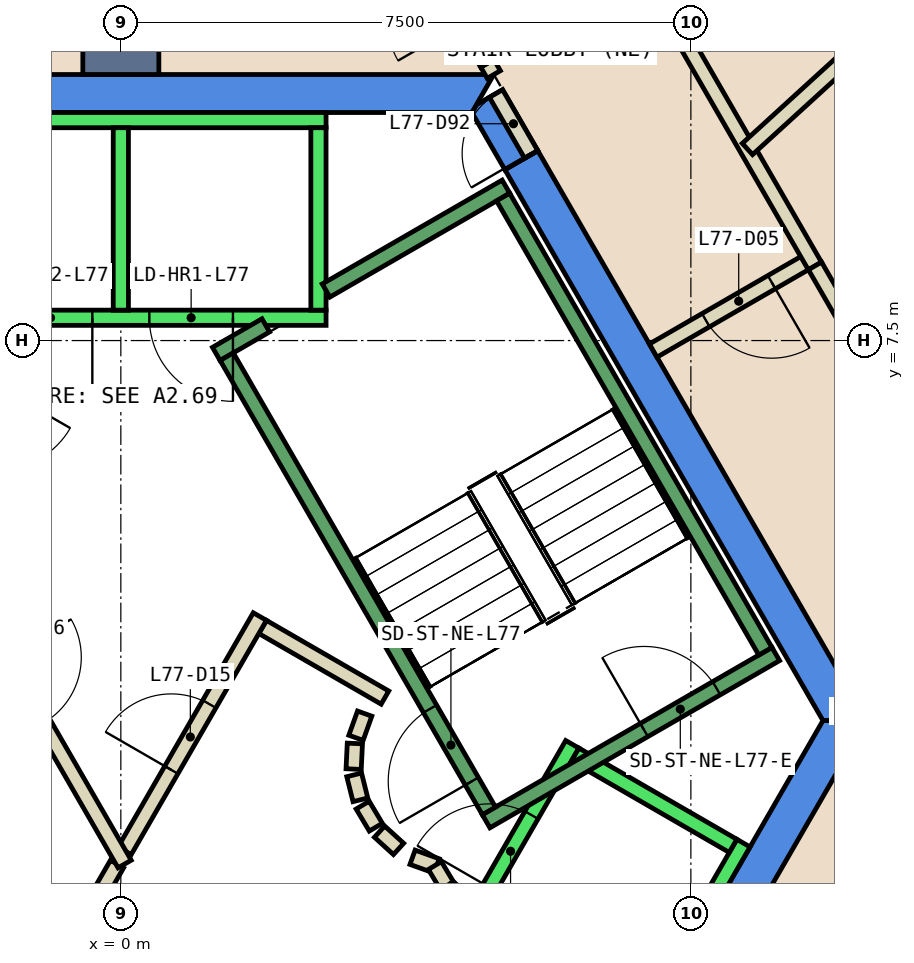
"""IFC4 building model, lengths in metres.
Left out: names, types, materials, properties, quantities, classifications, styles, units other than length and angle.
Written with IfcOpenShell. Run it as: python <this file> out.ifc"""

import sys

from ifc_helpers import new_model, si_unit, direction, frame, frame_2d, origin, place, context, subcontext, project, spatial, polyline, rectangle, outline, extrude, element, fill, save


model = new_model("IFC4")
c1 = context("Model", 3, precision=1e-05, world=origin(), true_north=direction((0.0, 1.0)))
c2 = subcontext(c1, "Body", "Model", "MODEL_VIEW")
j1 = project(units=[si_unit("LENGTHUNIT", "METRE"), si_unit("PLANEANGLEUNIT", "RADIAN")], contexts=[c1])
p1 = place(None, origin())
s1 = spatial("IfcSite", under=j1, at=p1, CompositionType="ELEMENT")
p2 = place(p1, origin())
s2 = spatial("IfcBuilding", under=s1, at=p2, CompositionType="ELEMENT")
p3 = place(p2, frame((0.0, 0.0, 326.0)))
s3 = spatial("IfcBuildingStorey", under=s2, at=p3, CompositionType="ELEMENT", Elevation=326.0)
p4 = place(p3, frame((0.0, 0.0, -0.6)))
e1 = element("IfcWall", 1, at=p4, inside=s3, PredefinedType="SHEAR", context=c2, shape_type="SweptSolid", body=[
    extrude(outline(polyline([(5.486, 9.998), (5.053, 9.748), (9.238, 2.5), (9.815, 2.5), (5.486, 9.998)])), origin(), (0.0, 0.0, 1.0), 5.55),
])
p5 = place(p3, frame((0.0, 0.0, 3.6)))
e2 = element("IfcWall", 2, at=p5, inside=s3, PredefinedType="SHEAR", context=c2, shape_type="SweptSolid", body=[
    extrude(outline(polyline([(5.022, 10.8), (4.677, 10.601), (4.619, 10.5), (5.053, 9.748), (5.486, 9.998), (5.022, 10.8)])), origin(), (0.0, 0.0, 1.0), 1.35),
])
p6 = place(p3, frame((0.0, 0.0, -0.6)))
e3 = element("IfcWall", 3, at=p6, inside=s3, PredefinedType="SHEAR", context=c2, shape_type="SweptSolid", body=[
    extrude(outline(polyline([(4.907, 11.0), (-4.907, 11.0), (-4.619, 10.5), (4.619, 10.5), (4.907, 11.0)])), origin(), (0.0, 0.0, 1.0), 5.55),
])
p7 = place(p3, frame((0.0, 0.0, -0.6)))
e4 = element("IfcWall", 4, at=p7, inside=s3, PredefinedType="SHEAR", context=c2, shape_type="SweptSolid", body=[
    extrude(outline(polyline([(4.907, -6.0), (9.815, 2.5), (9.238, 2.5), (4.619, -5.5), (4.907, -6.0)])), origin(), (0.0, 0.0, 1.0), 5.55),
])
p8 = place(p3, frame((0.0, 11.0, 0.0), z_axis=(0.0, 0.0, 1.0), x_axis=(0.0, 1.0, 0.0)))
e5 = element("IfcWall", 5, at=p8, inside=s3, PredefinedType="SHEAR", context=c2, shape_type="SweptSolid", body=[
    extrude(rectangle(XDim=13.702, YDim=1.0, at=frame_2d((6.851, 0.0))), origin(), (0.0, 0.0, 1.0), 4.95),
])
p9 = place(p3, frame((-0.982, -1.0, 0.0), z_axis=(0.0, 0.0, 1.0), x_axis=(0.50024047865, 0.865886518847, 0.0)))
e6 = element("IfcWall", 6, at=p9, inside=s3, PredefinedType="PARTITIONING", context=c2, shape_type="SweptSolid", body=[
    extrude(rectangle(XDim=1.863, YDim=0.2, at=frame_2d((0.931, 0.0))), origin(), (0.0, 0.0, 1.0), 4.95),
])
p10 = place(p3, frame((1.866, 3.732, 0.0), z_axis=(0.0, 0.0, 1.0), x_axis=(0.866043361281, -0.499968895414, 0.0)))
e7 = element("IfcWall", 7, at=p10, inside=s3, PredefinedType="PARTITIONING", context=c2, shape_type="SweptSolid", body=[
    extrude(rectangle(XDim=1.858, YDim=0.2, at=frame_2d((0.929, 0.0))), origin(), (0.0, 0.0, 1.0), 4.95),
])
p11 = place(p3, frame((3.208, 2.592, 0.0), z_axis=(0.0, 0.0, 1.0), x_axis=(-0.337388820924, -0.941365382578, 0.0)))
e8 = element("IfcWall", 8, at=p11, inside=s3, PredefinedType="PARTITIONING", context=c2, shape_type="SweptSolid", body=[
    extrude(rectangle(XDim=0.338, YDim=0.2, at=frame_2d((0.169, 0.0))), origin(), (0.0, 0.0, 1.0), 4.95),
])
p12 = place(p3, frame((3.079, 2.199, 0.0), z_axis=(0.0, 0.0, 1.0), x_axis=(-0.047771483479, -0.998858290933, 0.0)))
e9 = element("IfcWall", 9, at=p12, inside=s3, PredefinedType="PARTITIONING", context=c2, shape_type="SweptSolid", body=[
    extrude(rectangle(XDim=0.337, YDim=0.2, at=frame_2d((0.169, 0.0))), origin(), (0.0, 0.0, 1.0), 4.95),
])
p13 = place(p3, frame((3.07, 1.786, 0.0), z_axis=(0.0, 0.0, 1.0), x_axis=(0.242705583207, -0.970099994784, 0.0)))
e10 = element("IfcWall", 10, at=p13, inside=s3, PredefinedType="PARTITIONING", context=c2, shape_type="SweptSolid", body=[
    extrude(rectangle(XDim=0.338, YDim=0.2, at=frame_2d((0.169, 0.0))), origin(), (0.0, 0.0, 1.0), 4.95),
])
for number, where, z_axis, x_axis in (
    (11, (3.182, 1.388, 0.0), (0.0, 0.0, 1.0), (0.512, -0.859, 0.0)),
    (12, (3.404, 1.039, 0.0), (0.0, 0.0, 1.0), (0.74, -0.672, 0.0)),
):
    element("IfcWall", number, at=place(p3, frame(where, z_axis=z_axis, x_axis=x_axis)), inside=s3, PredefinedType="PARTITIONING", context=c2, shape_type="SweptSolid", body=[
        extrude(rectangle(XDim=0.338, YDim=0.2, at=frame_2d((0.169, 0.0))), origin(), (0.0, 0.0, 1.0), 4.95),
    ])
p14 = place(p3, frame((3.838, 0.702, 0.0), z_axis=(0.0, 0.0, 1.0), x_axis=(0.941035081519, -0.338308993895, 0.0)))
e13 = element("IfcWall", 13, at=p14, inside=s3, PredefinedType="PARTITIONING", context=c2, shape_type="SweptSolid", body=[
    extrude(rectangle(XDim=0.337, YDim=0.2, at=frame_2d((0.168, 0.0))), origin(), (0.0, 0.0, 1.0), 4.95),
])
p15 = place(p3, frame((4.132, 0.593, 0.0), z_axis=(0.0, 0.0, 1.0), x_axis=(0.513561617048, -0.858052717201, 0.0)))
e14 = element("IfcWall", 14, at=p15, inside=s3, PredefinedType="PARTITIONING", context=c2, shape_type="SweptSolid", body=[
    extrude(rectangle(XDim=0.308, YDim=0.2, at=frame_2d((0.154, 0.0))), origin(), (0.0, 0.0, 1.0), 4.95),
])
p16 = place(p3, frame((4.301, 0.315, 0.0), z_axis=(0.0, 0.0, 1.0), x_axis=(0.741798017506, -0.670623367639, 0.0)))
e15 = element("IfcWall", 15, at=p16, inside=s3, PredefinedType="PARTITIONING", context=c2, shape_type="SweptSolid", body=[
    extrude(rectangle(XDim=0.309, YDim=0.2, at=frame_2d((0.154, 0.0))), origin(), (0.0, 0.0, 1.0), 4.95),
])
p17 = place(p3, frame((0.05, 0.787, 0.0), z_axis=(0.0, 0.0, 1.0), x_axis=(0.499954076797, 0.866051915934, 0.0)))
e16 = element("IfcWall", 16, at=p17, inside=s3, PredefinedType="PARTITIONING", context=c2, shape_type="SweptSolid", body=[
    extrude(rectangle(XDim=3.558, YDim=0.2, at=frame_2d((1.779, 0.0))), origin(), (0.0, 0.0, 1.0), 4.95),
])
p18 = place(p17, frame((1.229, 0.0, 0.0)))
e17 = element("IfcOpeningElement", 17, at=p18, cuts=e16, PredefinedType="OPENING", context=c2, shape_type="SweptSolid", body=[
    extrude(rectangle(XDim=1.0, YDim=2.1, at=frame_2d((0.5, 1.05))), frame((0.0, 0.11, 0.0), z_axis=(0.0, -1.0, 0.0), x_axis=(1.0, 0.0, 0.0)), (0.0, 0.0, 1.0), 0.22),
])
p19 = place(p3, frame((-2.54, 5.1, 0.0), z_axis=(0.0, 0.0, 1.0), x_axis=(0.499925051871, -0.866068670783, 0.0)))
e18 = element("IfcWall", 18, at=p19, inside=s3, PredefinedType="PARTITIONING", context=c2, shape_type="SweptSolid", body=[
    extrude(rectangle(XDim=5.181, YDim=0.2, at=frame_2d((2.59, 0.0))), origin(), (0.0, 0.0, 1.0), 4.95),
])
p20 = place(p19, frame((2.04, 0.0, 0.0)))
e19 = element("IfcOpeningElement", 19, at=p20, cuts=e18, PredefinedType="OPENING", context=c2, shape_type="SweptSolid", body=[
    extrude(rectangle(XDim=1.0, YDim=2.1, at=frame_2d((0.5, 1.05))), frame((0.0, 0.11, 0.0), z_axis=(0.0, -1.0, 0.0), x_axis=(1.0, 0.0, 0.0)), (0.0, 0.0, 1.0), 0.22),
])
p21 = place(p3, frame((9.082, 8.568, 0.0), z_axis=(0.0, 0.0, 1.0), x_axis=(-0.865955154139, -0.50012165622, 0.0)))
e20 = element("IfcWall", 20, at=p21, inside=s3, PredefinedType="PARTITIONING", context=c2, shape_type="SweptSolid", body=[
    extrude(rectangle(XDim=2.4, YDim=0.2, at=frame_2d((1.2, 0.0))), origin(), (0.0, 0.0, 1.0), 4.95),
])
p22 = place(p21, frame((0.6, 0.0, 0.0)))
e21 = element("IfcOpeningElement", 21, at=p22, cuts=e20, PredefinedType="OPENING", context=c2, shape_type="SweptSolid", body=[
    extrude(rectangle(XDim=1.0, YDim=2.1, at=frame_2d((0.5, 1.05))), frame((0.0, 0.11, 0.0), z_axis=(0.0, -1.0, 0.0), x_axis=(1.0, 0.0, 0.0)), (0.0, 0.0, 1.0), 0.22),
])
p23 = place(p3, frame((4.907, 11.0, 0.0), z_axis=(0.0, 0.0, 1.0), x_axis=(-0.5004692653, 0.865754303766, 0.0)))
e22 = element("IfcWall", 22, at=p23, inside=s3, PredefinedType="PARTITIONING", context=c2, shape_type="SweptSolid", body=[
    extrude(rectangle(XDim=0.17, YDim=0.2, at=frame_2d((0.085, 0.0))), origin(), (0.0, 0.0, 1.0), 2.4),
])
p24 = place(p3, frame((5.532, 14.717, 0.0), z_axis=(0.0, 0.0, 1.0), x_axis=(0.499968011863, -0.866043871356, 0.0)))
e23 = element("IfcWall", 23, at=p24, inside=s3, PredefinedType="PARTITIONING", context=c2, shape_type="SweptSolid", body=[
    extrude(rectangle(XDim=7.201, YDim=0.2, at=frame_2d((3.6, 0.0))), origin(), (0.0, 0.0, 1.0), 4.95),
])
p25 = place(p24, frame((2.143, 0.0, 0.0)))
e24 = element("IfcOpeningElement", 24, at=p25, cuts=e23, PredefinedType="OPENING", context=c2, shape_type="SweptSolid", body=[
    extrude(rectangle(XDim=1.0, YDim=2.1, at=frame_2d((0.5, 1.05))), frame((0.0, 0.11, 0.0), z_axis=(0.0, -1.0, 0.0), x_axis=(1.0, 0.0, 0.0)), (0.0, 0.0, 1.0), 0.22),
])
p26 = place(p3, frame((9.133, 8.482, 0.0), z_axis=(0.0, 0.0, 1.0), x_axis=(0.499927291608, -0.866067377925, 0.0)))
e25 = element("IfcWall", 25, at=p26, inside=s3, PredefinedType="PARTITIONING", context=c2, shape_type="SweptSolid", body=[
    extrude(rectangle(XDim=1.788, YDim=0.2, at=frame_2d((0.894, 0.0))), origin(), (0.0, 0.0, 1.0), 4.95),
])
p27 = place(p3, frame((5.399, 9.948, 0.0), z_axis=(0.0, 0.0, 1.0), x_axis=(-0.499882215713, 0.866093395895, 0.0)))
e26 = element("IfcWall", 26, at=p27, inside=s3, PredefinedType="PARTITIONING", context=c2, shape_type="SweptSolid", body=[
    extrude(rectangle(XDim=0.926, YDim=0.2, at=frame_2d((0.463, 0.0))), origin(), (0.0, 0.0, 1.0), 2.4),
])
p28 = place(p27, frame((0.017, 0.0, 0.0)))
e27 = element("IfcOpeningElement", 27, at=p28, cuts=e26, PredefinedType="OPENING", context=c2, shape_type="SweptSolid", body=[
    extrude(rectangle(XDim=0.9, YDim=2.1, at=frame_2d((0.45, 1.05))), frame((0.0, 0.11, 0.0), z_axis=(0.0, -1.0, 0.0), x_axis=(1.0, 0.0, 0.0)), (0.0, 0.0, 1.0), 0.22),
])
p29 = place(p3, frame((4.822, 11.147, 0.0), z_axis=(0.0, 0.0, 1.0), x_axis=(-0.499841768758, 0.866116739363, 0.0)))
e28 = element("IfcWall", 28, at=p29, inside=s3, PredefinedType="PARTITIONING", context=c2, shape_type="SweptSolid", body=[
    extrude(rectangle(XDim=2.539, YDim=0.2, at=frame_2d((1.27, 0.0))), origin(), (0.0, 0.0, 1.0), 4.95),
])
p30 = place(p29, frame((0.618, 0.0, 0.0)))
e29 = element("IfcOpeningElement", 29, at=p30, cuts=e28, PredefinedType="OPENING", context=c2, shape_type="SweptSolid", body=[
    extrude(rectangle(XDim=1.0, YDim=2.1, at=frame_2d((0.5, 1.05))), frame((0.0, 0.11, 0.0), z_axis=(0.0, -1.0, 0.0), x_axis=(1.0, 0.0, 0.0)), (0.0, 0.0, 1.0), 0.22),
])
p31 = place(p3, frame((12.564, 13.96, 0.0), z_axis=(0.0, 0.0, 1.0), x_axis=(-0.738865955228, -0.673852432069, 0.0)))
e30 = element("IfcWall", 30, at=p31, inside=s3, PredefinedType="PARTITIONING", context=c2, shape_type="SweptSolid", body=[
    extrude(rectangle(XDim=5.847, YDim=0.2, at=frame_2d((2.923, 0.0))), origin(), (0.0, 0.0, 1.0), 4.95),
])
p32 = place(p3, frame((2.7, 7.8, 0.0), z_axis=(0.0, 0.0, 1.0), x_axis=(-1.0, 0.0, 0.0)))
e31 = element("IfcWall", 31, at=p32, inside=s3, PredefinedType="STANDARD", context=c2, shape_type="SweptSolid", body=[
    extrude(rectangle(XDim=5.4, YDim=0.2, at=frame_2d((2.7, 0.0))), origin(), (0.0, 0.0, 1.0), 4.95),
])
p33 = place(p32, frame((1.225, 0.0, 0.0)))
e32 = element("IfcOpeningElement", 32, at=p33, cuts=e31, PredefinedType="OPENING", context=c2, shape_type="SweptSolid", body=[
    extrude(rectangle(XDim=1.1, YDim=2.1, at=frame_2d((0.55, 1.05))), frame((0.0, 0.11, 0.0), z_axis=(0.0, -1.0, 0.0), x_axis=(1.0, 0.0, 0.0)), (0.0, 0.0, 1.0), 0.22),
])
p34 = place(p32, frame((3.075, 0.0, 0.0)))
e33 = element("IfcOpeningElement", 33, at=p34, cuts=e31, PredefinedType="OPENING", context=c2, shape_type="SweptSolid", body=[
    extrude(rectangle(XDim=1.1, YDim=2.1, at=frame_2d((0.55, 1.05))), frame((0.0, 0.11, 0.0), z_axis=(0.0, -1.0, 0.0), x_axis=(1.0, 0.0, 0.0)), (0.0, 0.0, 1.0), 0.22),
])
p35 = place(p3, frame((2.7, 10.4, 0.0), z_axis=(0.0, 0.0, 1.0), x_axis=(-1.0, 0.0, 0.0)))
e34 = element("IfcWall", 34, at=p35, inside=s3, PredefinedType="STANDARD", context=c2, shape_type="SweptSolid", body=[
    extrude(rectangle(XDim=5.4, YDim=0.2, at=frame_2d((2.7, 0.0))), origin(), (0.0, 0.0, 1.0), 4.95),
])
for number, where, z_axis, x_axis in (
    (35, (2.6, 7.9, 0.0), (0.0, 0.0, 1.0), (0.0, 1.0, 0.0)),
    (36, (0.0, 7.9, 0.0), (0.0, 0.0, 1.0), (0.0, 1.0, 0.0)),
):
    element("IfcWall", number, at=place(p3, frame(where, z_axis=z_axis, x_axis=x_axis)), inside=s3, PredefinedType="STANDARD", context=c2, shape_type="SweptSolid", body=[
        extrude(rectangle(XDim=2.4, YDim=0.2, at=frame_2d((1.2, 0.0))), origin(), (0.0, 0.0, 1.0), 4.95),
    ])
p36 = place(p3, frame((3.24, -2.488, 0.0), z_axis=(0.0, 0.0, 1.0), x_axis=(0.500034260056, 0.866005622828, 0.0)))
e37 = element("IfcWall", 37, at=p36, inside=s3, PredefinedType="STANDARD", context=c2, shape_type="SweptSolid", body=[
    extrude(rectangle(XDim=5.399, YDim=0.2, at=frame_2d((2.7, 0.0))), origin(), (0.0, 0.0, 1.0), 4.95),
])
p37 = place(p36, frame((3.225, 0.0, 0.0)))
e38 = element("IfcOpeningElement", 38, at=p37, cuts=e37, PredefinedType="OPENING", context=c2, shape_type="SweptSolid", body=[
    extrude(rectangle(XDim=1.1, YDim=2.1, at=frame_2d((0.55, 1.05))), frame((0.0, 0.11, 0.0), z_axis=(0.0, -1.0, 0.0), x_axis=(1.0, 0.0, 0.0)), (0.0, 0.0, 1.0), 0.22),
])
p38 = place(p36, frame((1.225, 0.0, 0.0)))
e39 = element("IfcOpeningElement", 39, at=p38, cuts=e37, PredefinedType="OPENING", context=c2, shape_type="SweptSolid", body=[
    extrude(rectangle(XDim=1.1, YDim=2.1, at=frame_2d((0.55, 1.05))), frame((0.0, 0.11, 0.0), z_axis=(0.0, -1.0, 0.0), x_axis=(1.0, 0.0, 0.0)), (0.0, 0.0, 1.0), 0.22),
])
p39 = place(p3, frame((5.492, -3.788, 0.0), z_axis=(0.0, 0.0, 1.0), x_axis=(0.500034260056, 0.866005622828, 0.0)))
e40 = element("IfcWall", 40, at=p39, inside=s3, PredefinedType="STANDARD", context=c2, shape_type="SweptSolid", body=[
    extrude(rectangle(XDim=5.399, YDim=0.2, at=frame_2d((2.7, 0.0))), origin(), (0.0, 0.0, 1.0), 4.95),
])
p40 = place(p3, frame((5.977, 2.052, 0.0), z_axis=(0.0, 0.0, 1.0), x_axis=(0.865973769406, -0.500089422704, 0.0)))
e41 = element("IfcWall", 41, at=p40, inside=s3, PredefinedType="STANDARD", context=c2, shape_type="SweptSolid", body=[
    extrude(rectangle(XDim=2.399, YDim=0.2, at=frame_2d((1.2, 0.0))), origin(), (0.0, 0.0, 1.0), 4.95),
])
p41 = place(p3, frame((4.806, 1.176, 0.0), z_axis=(0.0, 0.0, 1.0), x_axis=(0.866059941101, 0.499940174841, 0.0)))
e42 = element("IfcWall", 42, at=p41, inside=s3, PredefinedType="STANDARD", context=c2, shape_type="SweptSolid", body=[
    extrude(rectangle(XDim=4.4, YDim=0.2, at=frame_2d((2.2, 0.0))), origin(), (0.0, 0.0, 1.0), 4.95),
])
p42 = place(p41, frame((2.4, 0.0, 0.0)))
e43 = element("IfcOpeningElement", 43, at=p42, cuts=e42, PredefinedType="OPENING", context=c2, shape_type="SweptSolid", body=[
    extrude(rectangle(XDim=1.1, YDim=2.2, at=frame_2d((0.55, 1.1))), frame((0.0, 0.11, 0.0), z_axis=(0.0, -1.0, 0.0), x_axis=(1.0, 0.0, 0.0)), (0.0, 0.0, 1.0), 0.22),
])
p43 = place(p3, frame((2.7, 8.158, 0.0), z_axis=(0.0, 0.0, 1.0), x_axis=(0.86611865017, 0.499838457731, 0.0)))
e44 = element("IfcWall", 44, at=p43, inside=s3, PredefinedType="STANDARD", context=c2, shape_type="SweptSolid", body=[
    extrude(rectangle(XDim=2.733, YDim=0.2, at=frame_2d((1.366, 0.0))), origin(), (0.0, 0.0, 1.0), 4.95),
])
p44 = place(p3, frame((1.256, 7.324, 0.0), z_axis=(0.0, 0.0, 1.0), x_axis=(0.865915093549, 0.500191014278, 0.0)))
e45 = element("IfcWall", 45, at=p44, inside=s3, PredefinedType="STANDARD", context=c2, shape_type="SweptSolid", body=[
    extrude(rectangle(XDim=0.752, YDim=0.2, at=frame_2d((0.376, 0.0))), origin(), (0.0, 0.0, 1.0), 4.95),
])
p45 = place(p3, frame((4.843, 1.312, 0.0), z_axis=(0.0, 0.0, 1.0), x_axis=(-0.499963383562, 0.866046543262, 0.0)))
e46 = element("IfcWall", 46, at=p45, inside=s3, PredefinedType="STANDARD", context=c2, shape_type="SweptSolid", body=[
    extrude(rectangle(XDim=6.9, YDim=0.2, at=frame_2d((3.45, 0.0))), origin(), (0.0, 0.0, 1.0), 4.95),
])
p46 = place(p45, frame((0.45, 0.0, 0.0)))
e47 = element("IfcOpeningElement", 47, at=p46, cuts=e46, PredefinedType="OPENING", context=c2, shape_type="SweptSolid", body=[
    extrude(rectangle(XDim=1.1, YDim=2.2, at=frame_2d((0.55, 1.1))), frame((0.0, 0.11, 0.0), z_axis=(0.0, -1.0, 0.0), x_axis=(1.0, 0.0, 0.0)), (0.0, 0.0, 1.0), 0.22),
])
p47 = place(p3, frame((8.48, 3.412, 0.0), z_axis=(0.0, 0.0, 1.0), x_axis=(-0.499978703459, 0.866037698999, 0.0)))
e48 = element("IfcWall", 48, at=p47, inside=s3, PredefinedType="STANDARD", context=c2, shape_type="SweptSolid", body=[
    extrude(rectangle(XDim=6.9, YDim=0.2, at=frame_2d((3.45, 0.0))), origin(), (0.0, 0.0, 1.0), 4.95),
])
p48 = place(p22, origin())
e49 = element("IfcDoor", 49, at=p48, inside=s3, OperationType="SINGLE_SWING_LEFT", PredefinedType="DOOR", context=c2, shape_type="SweptSolid", body=[
    extrude(rectangle(XDim=1.0, YDim=2.1, at=frame_2d((0.5, 1.05))), frame((0.0, 0.025, 0.0), z_axis=(0.0, -1.0, 0.0), x_axis=(1.0, 0.0, 0.0)), (0.0, 0.0, 1.0), 0.05),
])
fill(e21, e49)
p49 = place(p18, origin())
e50 = element("IfcDoor", 50, at=p49, inside=s3, OperationType="SINGLE_SWING_RIGHT", PredefinedType="DOOR", context=c2, shape_type="SweptSolid", body=[
    extrude(rectangle(XDim=1.0, YDim=2.1, at=frame_2d((0.5, 1.05))), frame((0.0, 0.025, 0.0), z_axis=(0.0, -1.0, 0.0), x_axis=(1.0, 0.0, 0.0)), (0.0, 0.0, 1.0), 0.05),
])
fill(e17, e50)
p50 = place(p28, origin())
e51 = element("IfcDoor", 51, at=p50, inside=s3, OperationType="SINGLE_SWING_LEFT", PredefinedType="DOOR", context=c2, shape_type="SweptSolid", body=[
    extrude(rectangle(XDim=0.9, YDim=2.1, at=frame_2d((0.45, 1.05))), frame((0.0, 0.025, 0.0), z_axis=(0.0, -1.0, 0.0), x_axis=(1.0, 0.0, 0.0)), (0.0, 0.0, 1.0), 0.05),
])
fill(e27, e51)
p51 = place(p33, origin())
e52 = element("IfcDoor", 52, at=p51, inside=s3, OperationType="SLIDING_TO_LEFT", PredefinedType="DOOR", context=c2, shape_type="SweptSolid", body=[
    extrude(rectangle(XDim=1.1, YDim=2.1, at=frame_2d((0.55, 1.05))), frame((0.0, 0.025, 0.0), z_axis=(0.0, -1.0, 0.0), x_axis=(1.0, 0.0, 0.0)), (0.0, 0.0, 1.0), 0.05),
])
fill(e32, e52)
p52 = place(p34, origin())
e53 = element("IfcDoor", 53, at=p52, inside=s3, OperationType="SLIDING_TO_LEFT", PredefinedType="DOOR", context=c2, shape_type="SweptSolid", body=[
    extrude(rectangle(XDim=1.1, YDim=2.1, at=frame_2d((0.55, 1.05))), frame((0.0, 0.025, 0.0), z_axis=(0.0, -1.0, 0.0), x_axis=(1.0, 0.0, 0.0)), (0.0, 0.0, 1.0), 0.05),
])
fill(e33, e53)
p53 = place(p37, origin())
e54 = element("IfcDoor", 54, at=p53, inside=s3, OperationType="SLIDING_TO_LEFT", PredefinedType="DOOR", context=c2, shape_type="SweptSolid", body=[
    extrude(rectangle(XDim=1.1, YDim=2.1, at=frame_2d((0.55, 1.05))), frame((0.0, 0.025, 0.0), z_axis=(0.0, -1.0, 0.0), x_axis=(1.0, 0.0, 0.0)), (0.0, 0.0, 1.0), 0.05),
])
fill(e38, e54)
p54 = place(p46, origin())
e55 = element("IfcDoor", 55, at=p54, inside=s3, OperationType="SINGLE_SWING_LEFT", PredefinedType="DOOR", context=c2, shape_type="SweptSolid", body=[
    extrude(rectangle(XDim=1.1, YDim=2.2, at=frame_2d((0.55, 1.1))), frame((0.0, 0.025, 0.0), z_axis=(0.0, -1.0, 0.0), x_axis=(1.0, 0.0, 0.0)), (0.0, 0.0, 1.0), 0.05),
])
fill(e47, e55)
p55 = place(p42, origin())
e56 = element("IfcDoor", 56, at=p55, inside=s3, OperationType="SINGLE_SWING_LEFT", PredefinedType="DOOR", context=c2, shape_type="SweptSolid", body=[
    extrude(rectangle(XDim=1.1, YDim=2.2, at=frame_2d((0.55, 1.1))), frame((0.0, 0.025, 0.0), z_axis=(0.0, -1.0, 0.0), x_axis=(1.0, 0.0, 0.0)), (0.0, 0.0, 1.0), 0.05),
])
fill(e43, e56)
save(model, sys.argv[1])
